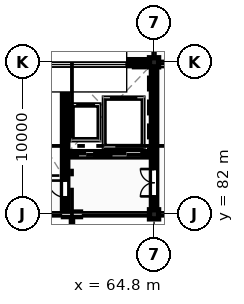
"""IFC4 building model, lengths in metres.
Left out: names, types, materials, properties, quantities, classifications, styles, units other than length and angle.
Written with IfcOpenShell. Run it as: python <this file> out.ifc"""

import sys

from ifc_helpers import new_model, si_unit, direction, frame, frame_2d, origin, origin_2d, place, context, subcontext, project, spatial, rectangle, extrude, element, fill, save


model = new_model("IFC4")
c1 = context("Model", 3, precision=1e-05, world=origin(), true_north=direction((0.0, 1.0)))
c2 = subcontext(c1, "Body", "Model", "MODEL_VIEW")
j1 = project(units=[si_unit("LENGTHUNIT", "METRE"), si_unit("PLANEANGLEUNIT", "RADIAN")], contexts=[c1])
p1 = place(None, origin())
s1 = spatial("IfcSite", under=j1, at=p1, CompositionType="ELEMENT")
p2 = place(p1, origin())
s2 = spatial("IfcBuilding", under=s1, at=p2, CompositionType="ELEMENT")
p3 = place(p2, frame((0.0, 0.0, 28.8)))
s3 = spatial("IfcBuildingStorey", under=s2, at=p3, CompositionType="ELEMENT", Elevation=28.8)
for number, where, z_axis, x_axis in (
    (1, (64.8, 82.0, 0.0), (0.0, 0.0, 1.0), (1.0, 0.0, 0.0)),
    (2, (64.8, 92.0, 0.0), (0.0, 0.0, 1.0), (1.0, 0.0, 0.0)),
):
    element("IfcColumn", number, at=place(p3, frame(where, z_axis=z_axis, x_axis=x_axis)), inside=s3, PredefinedType="COLUMN", context=c2, shape_type="SweptSolid", body=[
        extrude(rectangle(XDim=0.6, YDim=0.6, at=origin_2d()), origin(), (0.0, 0.0, 1.0), 5.4),
    ])
p4 = place(p3, frame((58.75, 82.0, 0.0), z_axis=(0.0, 0.0, 1.0), x_axis=(1.0, 0.0, 0.0)))
e3 = element("IfcWall", 3, at=p4, inside=s3, PredefinedType="STANDARD", context=c2, shape_type="SweptSolid", body=[
    extrude(rectangle(XDim=1.3, YDim=0.48, at=frame_2d((0.65, 0.0))), origin(), (0.0, 0.0, 1.0), 5.044),
])
p5 = place(p3, frame((64.43, 82.0, 0.0), z_axis=(0.0, 0.0, 1.0), x_axis=(1.0, 0.0, 0.0)))
e4 = element("IfcWall", 4, at=p5, inside=s3, PredefinedType="STANDARD", context=c2, shape_type="SweptSolid", body=[
    extrude(rectangle(XDim=0.225, YDim=0.3, at=frame_2d((0.113, 0.0))), origin(), (0.0, 0.0, 1.0), 5.16),
])
p6 = place(p3, frame((64.945, 82.0, 0.0), z_axis=(0.0, 0.0, 1.0), x_axis=(1.0, 0.0, 0.0)))
e5 = element("IfcWall", 5, at=p6, inside=s3, PredefinedType="STANDARD", context=c2, shape_type="SweptSolid", body=[
    extrude(rectangle(XDim=0.225, YDim=0.3, at=frame_2d((0.112, 0.0))), origin(), (0.0, 0.0, 1.0), 5.16),
])
p7 = place(p3, frame((54.16, 91.85, 5.4), z_axis=(0.0, 0.0, 1.0), x_axis=(1.0, 0.0, 0.0)))
e6 = element("IfcWall", 6, at=p7, inside=s3, PredefinedType="STANDARD", context=c2, shape_type="SweptSolid", body=[
    extrude(rectangle(XDim=10.48, YDim=0.32, at=frame_2d((5.24, 0.0))), origin(), (0.0, 0.0, 1.0), 2.45),
])
p8 = place(p7, frame((1.64, 0.0, 0.45)))
e7 = element("IfcOpeningElement", 7, at=p8, cuts=e6, PredefinedType="OPENING", context=c2, shape_type="SweptSolid", body=[
    extrude(rectangle(XDim=7.2, YDim=1.5, at=frame_2d((3.6, 0.75))), frame((0.0, 0.17, 0.0), z_axis=(0.0, -1.0, 0.0), x_axis=(1.0, 0.0, 0.0)), (0.0, 0.0, 1.0), 0.34),
])
p9 = place(p3, frame((64.96, 91.85, 5.4), z_axis=(0.0, 0.0, 1.0), x_axis=(1.0, 0.0, 0.0)))
e8 = element("IfcWall", 8, at=p9, inside=s3, PredefinedType="STANDARD", context=c2, shape_type="SweptSolid", body=[
    extrude(rectangle(XDim=10.48, YDim=0.32, at=frame_2d((5.24, 0.0))), origin(), (0.0, 0.0, 1.0), 2.45),
])
p10 = place(p9, frame((1.64, 0.0, 0.45)))
e9 = element("IfcOpeningElement", 9, at=p10, cuts=e8, PredefinedType="OPENING", context=c2, shape_type="SweptSolid", body=[
    extrude(rectangle(XDim=7.2, YDim=1.5, at=frame_2d((3.6, 0.75))), frame((0.0, 0.17, 0.0), z_axis=(0.0, -1.0, 0.0), x_axis=(1.0, 0.0, 0.0)), (0.0, 0.0, 1.0), 0.34),
])
p11 = place(p3, frame((0.35, 82.0, 5.22), z_axis=(0.0, 0.0, 1.0), x_axis=(1.0, 0.0, 0.0)))
e10 = element("IfcWall", 10, at=p11, inside=s3, PredefinedType="PARAPET", context=c2, shape_type="SweptSolid", body=[
    extrude(rectangle(XDim=74.9, YDim=0.26, at=frame_2d((37.45, 0.0))), origin(), (0.0, 0.0, 1.0), 0.55),
])
p12 = place(p3, frame((54.3, 92.0, 0.0), z_axis=(0.0, 0.0, 1.0), x_axis=(1.0, 0.0, 0.0)))
e11 = element("IfcWall", 11, at=p12, inside=s3, PredefinedType="SHEAR", context=c2, shape_type="SweptSolid", body=[
    extrude(rectangle(XDim=10.2, YDim=0.35, at=frame_2d((5.1, 0.0))), origin(), (0.0, 0.0, 1.0), 5.16),
])
p13 = place(p3, frame((64.8, 82.3, 0.0), z_axis=(0.0, 0.0, 1.0), x_axis=(0.0, 1.0, 0.0)))
e12 = element("IfcWall", 12, at=p13, inside=s3, PredefinedType="SHEAR", context=c2, shape_type="SweptSolid", body=[
    extrude(rectangle(XDim=9.4, YDim=0.35, at=frame_2d((4.7, 0.0))), origin(), (0.0, 0.0, 1.0), 5.16),
])
p14 = place(p13, frame((0.88, 0.0, 0.0)))
e13 = element("IfcOpeningElement", 13, at=p14, cuts=e12, PredefinedType="OPENING", context=c2, shape_type="SweptSolid", body=[
    extrude(rectangle(XDim=1.8, YDim=2.25, at=frame_2d((0.9, 1.125))), frame((0.0, 0.185, 0.0), z_axis=(0.0, -1.0, 0.0), x_axis=(1.0, 0.0, 0.0)), (0.0, 0.0, 1.0), 0.37),
])
p15 = place(p3, frame((58.95, 82.22, 0.0), z_axis=(0.0, 0.0, 1.0), x_axis=(0.0, 1.0, 0.0)))
e14 = element("IfcWall", 14, at=p15, inside=s3, PredefinedType="SHEAR", context=c2, shape_type="SweptSolid", body=[
    extrude(rectangle(XDim=9.605, YDim=0.35, at=frame_2d((4.802, 0.0))), origin(), (0.0, 0.0, 1.0), 5.16),
])
p16 = place(p15, frame((0.9, 0.0, 0.0)))
e15 = element("IfcOpeningElement", 15, at=p16, cuts=e14, PredefinedType="OPENING", context=c2, shape_type="SweptSolid", body=[
    extrude(rectangle(XDim=1.1, YDim=2.2, at=frame_2d((0.55, 1.1))), frame((0.0, 0.185, 0.0), z_axis=(0.0, -1.0, 0.0), x_axis=(1.0, 0.0, 0.0)), (0.0, 0.0, 1.0), 0.37),
])
p17 = place(p3, frame((59.13, 85.95, 0.0), z_axis=(0.0, 0.0, 1.0), x_axis=(1.0, 0.0, 0.0)))
e16 = element("IfcWall", 16, at=p17, inside=s3, PredefinedType="SHEAR", context=c2, shape_type="SweptSolid", body=[
    extrude(rectangle(XDim=5.49, YDim=0.35, at=frame_2d((2.745, 0.0))), origin(), (0.0, 0.0, 1.0), 5.16),
])
p18 = place(p17, frame((0.65, 0.0, 0.0)))
e17 = element("IfcOpeningElement", 17, at=p18, cuts=e16, PredefinedType="OPENING", context=c2, shape_type="SweptSolid", body=[
    extrude(rectangle(XDim=1.1, YDim=2.2, at=frame_2d((0.55, 1.1))), frame((0.0, 0.185, 0.0), z_axis=(0.0, -1.0, 0.0), x_axis=(1.0, 0.0, 0.0)), (0.0, 0.0, 1.0), 0.37),
])
p19 = place(p17, frame((2.85, 0.0, 0.0)))
e18 = element("IfcOpeningElement", 18, at=p19, cuts=e16, PredefinedType="OPENING", context=c2, shape_type="SweptSolid", body=[
    extrude(rectangle(XDim=2.0, YDim=2.5, at=frame_2d((1.0, 1.25))), frame((0.0, 0.185, 0.0), z_axis=(0.0, -1.0, 0.0), x_axis=(1.0, 0.0, 0.0)), (0.0, 0.0, 1.0), 0.37),
])
p20 = place(p3, frame((64.98, 92.0, 0.0), z_axis=(0.0, 0.0, 1.0), x_axis=(1.0, 0.0, 0.0)))
e19 = element("IfcWall", 19, at=p20, inside=s3, PredefinedType="PLUMBINGWALL", context=c2, shape_type="SweptSolid", body=[
    extrude(rectangle(XDim=4.82, YDim=0.18, at=frame_2d((2.41, 0.0))), origin(), (0.0, 0.0, 1.0), 5.044),
])
p21 = place(p20, frame((1.435, 0.0, 0.0)))
e20 = element("IfcOpeningElement", 20, at=p21, cuts=e19, PredefinedType="OPENING", context=c2, shape_type="SweptSolid", body=[
    extrude(rectangle(XDim=1.95, YDim=2.5, at=frame_2d((0.975, 1.25))), frame((0.0, 0.1, 0.0), z_axis=(0.0, -1.0, 0.0), x_axis=(1.0, 0.0, 0.0)), (0.0, 0.0, 1.0), 0.2),
])
p22 = place(p3, frame((64.8, 92.18, 0.0), z_axis=(0.0, 0.0, 1.0), x_axis=(0.0, 1.0, 0.0)))
e21 = element("IfcWall", 21, at=p22, inside=s3, PredefinedType="PLUMBINGWALL", context=c2, shape_type="SweptSolid", body=[
    extrude(rectangle(XDim=4.62, YDim=0.18, at=frame_2d((2.31, 0.0))), origin(), (0.0, 0.0, 1.0), 5.12),
])
p23 = place(p8, origin())
e22 = element("IfcWindow", 22, at=p23, inside=s3, PartitioningType="SINGLE_PANEL", PredefinedType="SKYLIGHT", context=c2, shape_type="SweptSolid", body=[
    extrude(rectangle(XDim=7.2, YDim=1.5, at=frame_2d((3.6, 0.75))), frame((0.0, 0.03, 0.0), z_axis=(0.0, -1.0, 0.0), x_axis=(1.0, 0.0, 0.0)), (0.0, 0.0, 1.0), 0.06),
])
fill(e7, e22)
p24 = place(p16, origin())
e23 = element("IfcDoor", 23, at=p24, inside=s3, OperationType="SINGLE_SWING_RIGHT", PredefinedType="DOOR", context=c2, shape_type="SweptSolid", body=[
    extrude(rectangle(XDim=1.1, YDim=2.2, at=frame_2d((0.55, 1.1))), frame((0.0, 0.025, 0.0), z_axis=(0.0, -1.0, 0.0), x_axis=(1.0, 0.0, 0.0)), (0.0, 0.0, 1.0), 0.05),
])
fill(e15, e23)
p25 = place(p14, origin())
e24 = element("IfcDoor", 24, at=p25, inside=s3, OperationType="DOUBLE_DOOR_SINGLE_SWING", PredefinedType="DOOR", context=c2, shape_type="SweptSolid", body=[
    extrude(rectangle(XDim=1.8, YDim=2.25, at=frame_2d((0.9, 1.125))), frame((0.0, 0.025, 0.0), z_axis=(0.0, -1.0, 0.0), x_axis=(1.0, 0.0, 0.0)), (0.0, 0.0, 1.0), 0.05),
])
fill(e13, e24)
p26 = place(p18, origin())
e25 = element("IfcDoor", 25, at=p26, inside=s3, OperationType="DOUBLE_DOOR_SLIDING", PredefinedType="DOOR", context=c2, shape_type="SweptSolid", body=[
    extrude(rectangle(XDim=1.1, YDim=2.2, at=frame_2d((0.55, 1.1))), frame((0.0, 0.025, 0.0), z_axis=(0.0, -1.0, 0.0), x_axis=(1.0, 0.0, 0.0)), (0.0, 0.0, 1.0), 0.05),
])
fill(e17, e25)
p27 = place(p19, origin())
e26 = element("IfcDoor", 26, at=p27, inside=s3, OperationType="DOUBLE_DOOR_SLIDING", PredefinedType="DOOR", context=c2, shape_type="SweptSolid", body=[
    extrude(rectangle(XDim=2.0, YDim=2.5, at=frame_2d((1.0, 1.25))), frame((0.0, 0.025, 0.0), z_axis=(0.0, -1.0, 0.0), x_axis=(1.0, 0.0, 0.0)), (0.0, 0.0, 1.0), 0.05),
])
fill(e18, e26)
save(model, sys.argv[1])
